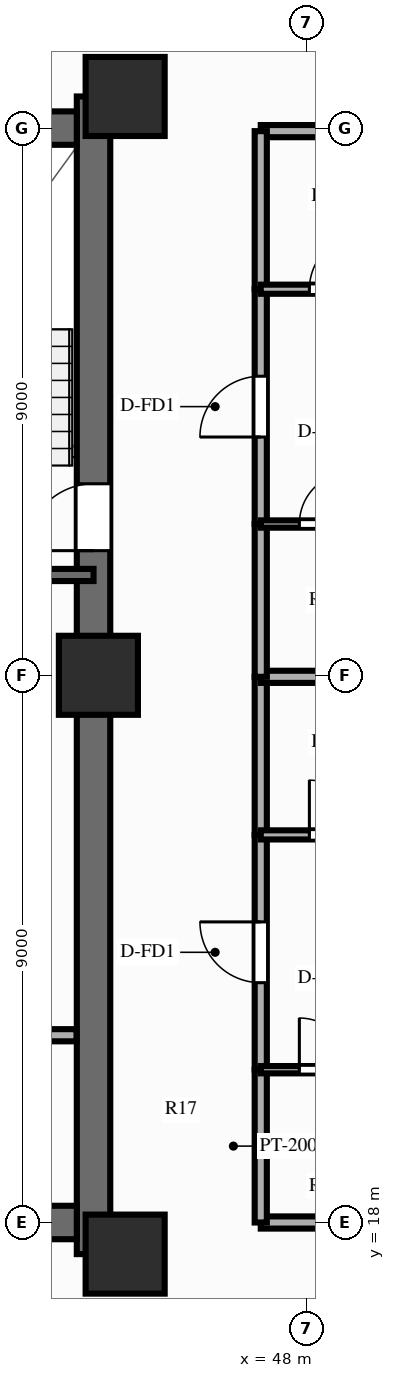
"""IFC4 building model, lengths in metres.
Left out: names, types, materials, properties, quantities, classifications, styles, units other than length and angle.
Written with IfcOpenShell. Run it as: python <this file> out.ifc"""

import sys

from ifc_helpers import new_model, si_unit, direction, frame, frame_2d, origin, origin_2d, place, context, subcontext, project, spatial, rectangle, extrude, source, transform, mapped, element, fill, save


model = new_model("IFC4")
c1 = context("Model", 3, precision=1e-05, world=origin(), true_north=direction((0.0, 1.0)))
c2 = subcontext(c1, "Body", "Model", "MODEL_VIEW")
j1 = project(units=[si_unit("LENGTHUNIT", "METRE"), si_unit("PLANEANGLEUNIT", "RADIAN")], contexts=[c1])
p1 = place(None, origin())
s1 = spatial("IfcSite", under=j1, at=p1, CompositionType="ELEMENT")
p2 = place(p1, origin())
s2 = spatial("IfcBuilding", under=s1, at=p2, CompositionType="ELEMENT")
p3 = place(p2, frame((0.0, 0.0, 86.85)))
s3 = spatial("IfcBuildingStorey", under=s2, at=p3, CompositionType="ELEMENT", Elevation=86.85)
p4 = place(p3, frame((44.5, 17.48, 0.0), z_axis=(0.0, 0.0, 1.0), x_axis=(0.0, 1.0, 0.0)))
e1 = element("IfcWall", 1, at=p4, inside=s3, PredefinedType="SHEAR", context=c2, shape_type="SweptSolid", body=[
    extrude(rectangle(XDim=19.04, YDim=0.55, at=frame_2d((9.52, 0.0))), origin(), (0.0, 0.0, 1.0), 3.0),
])
p5 = place(p4, frame((12.67, 0.0, 0.0), z_axis=(0.0, 0.0, 1.0), x_axis=(-1.0, 0.0, 0.0)))
e2 = element("IfcOpeningElement", 2, at=p5, cuts=e1, PredefinedType="OPENING", context=c2, shape_type="SweptSolid", body=[
    extrude(rectangle(XDim=1.1, YDim=2.15, at=frame_2d((0.55, 1.075))), frame((0.0, 0.287, 0.0), z_axis=(0.0, -1.0, 0.0), x_axis=(1.0, 0.0, 0.0)), (0.0, 0.0, 1.0), 0.574),
])
p6 = place(p3, frame((31.775, 18.0, 0.0), z_axis=(0.0, 0.0, 1.0), x_axis=(1.0, 0.0, 0.0)))
e3 = element("IfcWall", 3, at=p6, inside=s3, PredefinedType="SHEAR", context=c2, shape_type="SweptSolid", body=[
    extrude(rectangle(XDim=12.45, YDim=0.55, at=frame_2d((6.225, 0.0))), origin(), (0.0, 0.0, 1.0), 3.0),
])
p7 = place(p3, frame((31.775, 36.0, 0.0), z_axis=(0.0, 0.0, 1.0), x_axis=(1.0, 0.0, 0.0)))
e4 = element("IfcWall", 4, at=p7, inside=s3, PredefinedType="SHEAR", context=c2, shape_type="SweptSolid", body=[
    extrude(rectangle(XDim=12.45, YDim=0.55, at=frame_2d((6.225, 0.0))), origin(), (0.0, 0.0, 1.0), 3.0),
])
p8 = place(p7, frame((5.175, 0.0, 0.0), z_axis=(0.0, 0.0, 1.0), x_axis=(-1.0, 0.0, 0.0)))
e5 = element("IfcOpeningElement", 5, at=p8, cuts=e4, PredefinedType="OPENING", context=c2, shape_type="SweptSolid", body=[
    extrude(rectangle(XDim=1.4, YDim=2.15, at=frame_2d((0.7, 1.075))), frame((0.0, 0.287, 0.0), z_axis=(0.0, -1.0, 0.0), x_axis=(1.0, 0.0, 0.0)), (0.0, 0.0, 1.0), 0.574),
])
m1 = source(origin(), c2, "Body", "SweptSolid", [
    extrude(rectangle(XDim=1.3, YDim=1.3, at=origin_2d()), origin(), (0.0, 0.0, 1.0), 3.0),
])
for number, where, z_axis, x_axis in (
    (6, (45.02, 17.48, 0.0), (0.0, 0.0, 1.0), (1.0, 0.0, 0.0)),
    (7, (45.02, 36.52, 0.0), (0.0, 0.0, 1.0), (1.0, 0.0, 0.0)),
    (8, (44.58, 27.0, 0.0), (0.0, 0.0, 1.0), (1.0, 0.0, 0.0)),
):
    element("IfcColumn", number, at=place(p3, frame(where, z_axis=z_axis, x_axis=x_axis)), inside=s3, PredefinedType="COLUMN", context=c2, shape_type="MappedRepresentation", body=[
        mapped(m1, transform((0.0, 0.0, 0.0), scale=1.0)),
    ])
p9 = place(p3, frame((42.88, 21.08, 0.0), z_axis=(0.0, 0.0, 1.0), x_axis=(1.0, 0.0, 0.0)))
e9 = element("IfcWall", 9, at=p9, inside=s3, PredefinedType="PARTITIONING", context=c2, shape_type="SweptSolid", body=[
    extrude(rectangle(XDim=1.34, YDim=0.2, at=frame_2d((0.67, 0.0))), origin(), (0.0, 0.0, 1.0), 2.79),
])
p10 = place(p3, frame((40.57, 28.65, 0.0), z_axis=(0.0, 0.0, 1.0), x_axis=(1.0, 0.0, 0.0)))
e10 = element("IfcWall", 10, at=p10, inside=s3, PredefinedType="SOLIDWALL", context=c2, shape_type="SweptSolid", body=[
    extrude(rectangle(XDim=3.93, YDim=0.2, at=frame_2d((1.965, 0.0))), origin(), (0.0, 0.0, 1.0), 2.79),
])
for number, where, z_axis, x_axis in (
    (11, (47.25, 18.0, 0.0), (0.0, 0.0, 1.0), (1.0, 0.0, 0.0)),
    (12, (47.25, 35.95, 0.0), (0.0, 0.0, 1.0), (1.0, 0.0, 0.0)),
):
    element("IfcWall", number, at=place(p3, frame(where, z_axis=z_axis, x_axis=x_axis)), inside=s3, PredefinedType="PARTITIONING", context=c2, shape_type="SweptSolid", body=[
        extrude(rectangle(XDim=16.6, YDim=0.2, at=frame_2d((8.3, 0.0))), origin(), (0.0, 0.0, 1.0), 2.34),
    ])
p11 = place(p3, frame((47.25, 18.0, 0.0), z_axis=(0.0, 0.0, 1.0), x_axis=(0.0, 1.0, 0.0)))
e13 = element("IfcWall", 13, at=p11, inside=s3, PredefinedType="PARTITIONING", context=c2, shape_type="SweptSolid", body=[
    extrude(rectangle(XDim=2.513, YDim=0.2, at=frame_2d((1.256, 0.0))), origin(), (0.0, 0.0, 1.0), 2.79),
])
p12 = place(p3, frame((47.25, 20.513, 0.0), z_axis=(0.0, 0.0, 1.0), x_axis=(0.0, 1.0, 0.0)))
e14 = element("IfcWall", 14, at=p12, inside=s3, PredefinedType="PARTITIONING", context=c2, shape_type="SweptSolid", body=[
    extrude(rectangle(XDim=3.862, YDim=0.2, at=frame_2d((1.931, 0.0))), origin(), (0.0, 0.0, 1.0), 2.79),
])
p13 = place(p12, frame((1.431, 0.0, 0.0)))
e15 = element("IfcOpeningElement", 15, at=p13, cuts=e14, PredefinedType="OPENING", context=c2, shape_type="SweptSolid", body=[
    extrude(rectangle(XDim=1.0, YDim=2.15, at=frame_2d((0.5, 1.075))), frame((0.0, 0.112, 0.0), z_axis=(0.0, -1.0, 0.0), x_axis=(1.0, 0.0, 0.0)), (0.0, 0.0, 1.0), 0.224),
])
p14 = place(p3, frame((47.25, 24.375, 0.0), z_axis=(0.0, 0.0, 1.0), x_axis=(0.0, 1.0, 0.0)))
e16 = element("IfcWall", 16, at=p14, inside=s3, PredefinedType="PARTITIONING", context=c2, shape_type="SweptSolid", body=[
    extrude(rectangle(XDim=2.6, YDim=0.2, at=frame_2d((1.3, 0.0))), origin(), (0.0, 0.0, 1.0), 2.79),
])
p15 = place(p3, frame((47.25, 20.513, 0.0), z_axis=(0.0, 0.0, 1.0), x_axis=(1.0, 0.0, 0.0)))
e17 = element("IfcWall", 17, at=p15, inside=s3, PredefinedType="PARTITIONING", context=c2, shape_type="SweptSolid", body=[
    extrude(rectangle(XDim=2.12, YDim=0.12, at=frame_2d((1.06, 0.0))), origin(), (0.0, 0.0, 1.0), 2.79),
])
p16 = place(p15, frame((0.635, 0.0, 0.0)))
e18 = element("IfcOpeningElement", 18, at=p16, cuts=e17, PredefinedType="OPENING", context=c2, shape_type="SweptSolid", body=[
    extrude(rectangle(XDim=0.85, YDim=2.05, at=frame_2d((0.425, 1.025))), frame((0.0, 0.072, 0.0), z_axis=(0.0, -1.0, 0.0), x_axis=(1.0, 0.0, 0.0)), (0.0, 0.0, 1.0), 0.144),
])
p17 = place(p3, frame((47.25, 24.375, 0.0), z_axis=(0.0, 0.0, 1.0), x_axis=(1.0, 0.0, 0.0)))
e19 = element("IfcWall", 19, at=p17, inside=s3, PredefinedType="PARTITIONING", context=c2, shape_type="SweptSolid", body=[
    extrude(rectangle(XDim=2.5, YDim=0.15, at=frame_2d((1.25, 0.0))), origin(), (0.0, 0.0, 1.0), 2.79),
])
p18 = place(p17, frame((0.8, 0.0, 0.0)))
e20 = element("IfcOpeningElement", 20, at=p18, cuts=e19, PredefinedType="OPENING", context=c2, shape_type="SweptSolid", body=[
    extrude(rectangle(XDim=0.9, YDim=2.1, at=frame_2d((0.45, 1.05))), frame((0.0, 0.087, 0.0), z_axis=(0.0, -1.0, 0.0), x_axis=(1.0, 0.0, 0.0)), (0.0, 0.0, 1.0), 0.174),
])
p19 = place(p3, frame((47.25, 26.975, 0.0), z_axis=(0.0, 0.0, 1.0), x_axis=(1.0, 0.0, 0.0)))
e21 = element("IfcWall", 21, at=p19, inside=s3, PredefinedType="PARTITIONING", context=c2, shape_type="SweptSolid", body=[
    extrude(rectangle(XDim=16.6, YDim=0.2, at=frame_2d((8.3, 0.0))), origin(), (0.0, 0.0, 1.0), 2.79),
])
p20 = place(p3, frame((47.25, 26.975, 0.0), z_axis=(0.0, 0.0, 1.0), x_axis=(0.0, 1.0, 0.0)))
e22 = element("IfcWall", 22, at=p20, inside=s3, PredefinedType="PARTITIONING", context=c2, shape_type="SweptSolid", body=[
    extrude(rectangle(XDim=2.513, YDim=0.2, at=frame_2d((1.256, 0.0))), origin(), (0.0, 0.0, 1.0), 2.79),
])
p21 = place(p3, frame((47.25, 29.488, 0.0), z_axis=(0.0, 0.0, 1.0), x_axis=(0.0, 1.0, 0.0)))
e23 = element("IfcWall", 23, at=p21, inside=s3, PredefinedType="PARTITIONING", context=c2, shape_type="SweptSolid", body=[
    extrude(rectangle(XDim=3.862, YDim=0.2, at=frame_2d((1.931, 0.0))), origin(), (0.0, 0.0, 1.0), 2.79),
])
p22 = place(p21, frame((1.431, 0.0, 0.0)))
e24 = element("IfcOpeningElement", 24, at=p22, cuts=e23, PredefinedType="OPENING", context=c2, shape_type="SweptSolid", body=[
    extrude(rectangle(XDim=1.0, YDim=2.15, at=frame_2d((0.5, 1.075))), frame((0.0, 0.112, 0.0), z_axis=(0.0, -1.0, 0.0), x_axis=(1.0, 0.0, 0.0)), (0.0, 0.0, 1.0), 0.224),
])
p23 = place(p3, frame((47.25, 33.35, 0.0), z_axis=(0.0, 0.0, 1.0), x_axis=(0.0, 1.0, 0.0)))
e25 = element("IfcWall", 25, at=p23, inside=s3, PredefinedType="PARTITIONING", context=c2, shape_type="SweptSolid", body=[
    extrude(rectangle(XDim=2.6, YDim=0.2, at=frame_2d((1.3, 0.0))), origin(), (0.0, 0.0, 1.0), 2.79),
])
p24 = place(p3, frame((47.25, 29.488, 0.0), z_axis=(0.0, 0.0, 1.0), x_axis=(1.0, 0.0, 0.0)))
e26 = element("IfcWall", 26, at=p24, inside=s3, PredefinedType="PARTITIONING", context=c2, shape_type="SweptSolid", body=[
    extrude(rectangle(XDim=2.12, YDim=0.12, at=frame_2d((1.06, 0.0))), origin(), (0.0, 0.0, 1.0), 2.79),
])
p25 = place(p24, frame((0.635, 0.0, 0.0)))
e27 = element("IfcOpeningElement", 27, at=p25, cuts=e26, PredefinedType="OPENING", context=c2, shape_type="SweptSolid", body=[
    extrude(rectangle(XDim=0.85, YDim=2.05, at=frame_2d((0.425, 1.025))), frame((0.0, 0.072, 0.0), z_axis=(0.0, -1.0, 0.0), x_axis=(1.0, 0.0, 0.0)), (0.0, 0.0, 1.0), 0.144),
])
p26 = place(p3, frame((47.25, 33.35, 0.0), z_axis=(0.0, 0.0, 1.0), x_axis=(1.0, 0.0, 0.0)))
e28 = element("IfcWall", 28, at=p26, inside=s3, PredefinedType="PARTITIONING", context=c2, shape_type="SweptSolid", body=[
    extrude(rectangle(XDim=2.5, YDim=0.15, at=frame_2d((1.25, 0.0))), origin(), (0.0, 0.0, 1.0), 2.79),
])
p27 = place(p26, frame((0.8, 0.0, 0.0)))
e29 = element("IfcOpeningElement", 29, at=p27, cuts=e28, PredefinedType="OPENING", context=c2, shape_type="SweptSolid", body=[
    extrude(rectangle(XDim=0.9, YDim=2.1, at=frame_2d((0.45, 1.05))), frame((0.0, 0.087, 0.0), z_axis=(0.0, -1.0, 0.0), x_axis=(1.0, 0.0, 0.0)), (0.0, 0.0, 1.0), 0.174),
])
m2 = source(origin(), c2, "Body", "SweptSolid", [
    extrude(rectangle(XDim=1.1, YDim=2.15, at=frame_2d((0.55, 1.075))), frame((0.0, 0.025, 0.0), z_axis=(0.0, -1.0, 0.0), x_axis=(1.0, 0.0, 0.0)), (0.0, 0.0, 1.0), 0.05),
])
p28 = place(p5, origin())
e30 = element("IfcDoor", 30, at=p28, inside=s3, OperationType="SINGLE_SWING_RIGHT", PredefinedType="DOOR", context=c2, shape_type="MappedRepresentation", body=[
    mapped(m2, transform((0.0, 0.0, 0.0), scale=1.0)),
])
fill(e2, e30)
m3 = source(origin(), c2, "Body", "SweptSolid", [
    extrude(rectangle(XDim=1.0, YDim=2.15, at=frame_2d((0.5, 1.075))), frame((0.0, 0.025, 0.0), z_axis=(0.0, -1.0, 0.0), x_axis=(1.0, 0.0, 0.0)), (0.0, 0.0, 1.0), 0.05),
])
p29 = place(p13, origin())
e31 = element("IfcDoor", 31, at=p29, inside=s3, OperationType="SINGLE_SWING_RIGHT", PredefinedType="DOOR", context=c2, shape_type="MappedRepresentation", body=[
    mapped(m3, transform((0.0, 0.0, 0.0), scale=1.0)),
])
fill(e15, e31)
m4 = source(origin(), c2, "Body", "SweptSolid", [
    extrude(rectangle(XDim=0.85, YDim=2.05, at=frame_2d((0.425, 1.025))), frame((0.0, 0.025, 0.0), z_axis=(0.0, -1.0, 0.0), x_axis=(1.0, 0.0, 0.0)), (0.0, 0.0, 1.0), 0.05),
])
p30 = place(p16, origin())
e32 = element("IfcDoor", 32, at=p30, inside=s3, OperationType="SINGLE_SWING_LEFT", PredefinedType="DOOR", context=c2, shape_type="MappedRepresentation", body=[
    mapped(m4, transform((0.0, 0.0, 0.0), scale=1.0)),
])
fill(e18, e32)
m5 = source(origin(), c2, "Body", "SweptSolid", [
    extrude(rectangle(XDim=0.9, YDim=2.1, at=frame_2d((0.45, 1.05))), frame((0.0, 0.025, 0.0), z_axis=(0.0, -1.0, 0.0), x_axis=(1.0, 0.0, 0.0)), (0.0, 0.0, 1.0), 0.05),
])
p31 = place(p18, origin())
e33 = element("IfcDoor", 33, at=p31, inside=s3, OperationType="SINGLE_SWING_LEFT", PredefinedType="DOOR", context=c2, shape_type="MappedRepresentation", body=[
    mapped(m5, transform((0.0, 0.0, 0.0), scale=1.0)),
])
fill(e20, e33)
p32 = place(p22, origin())
e34 = element("IfcDoor", 34, at=p32, inside=s3, OperationType="SINGLE_SWING_LEFT", PredefinedType="DOOR", context=c2, shape_type="MappedRepresentation", body=[
    mapped(m3, transform((0.0, 0.0, 0.0), scale=1.0)),
])
fill(e24, e34)
p33 = place(p25, origin())
e35 = element("IfcDoor", 35, at=p33, inside=s3, OperationType="SINGLE_SWING_RIGHT", PredefinedType="DOOR", context=c2, shape_type="MappedRepresentation", body=[
    mapped(m4, transform((0.0, 0.0, 0.0), scale=1.0)),
])
fill(e27, e35)
p34 = place(p27, origin())
e36 = element("IfcDoor", 36, at=p34, inside=s3, OperationType="SINGLE_SWING_RIGHT", PredefinedType="DOOR", context=c2, shape_type="MappedRepresentation", body=[
    mapped(m5, transform((0.0, 0.0, 0.0), scale=1.0)),
])
fill(e29, e36)
save(model, sys.argv[1])
